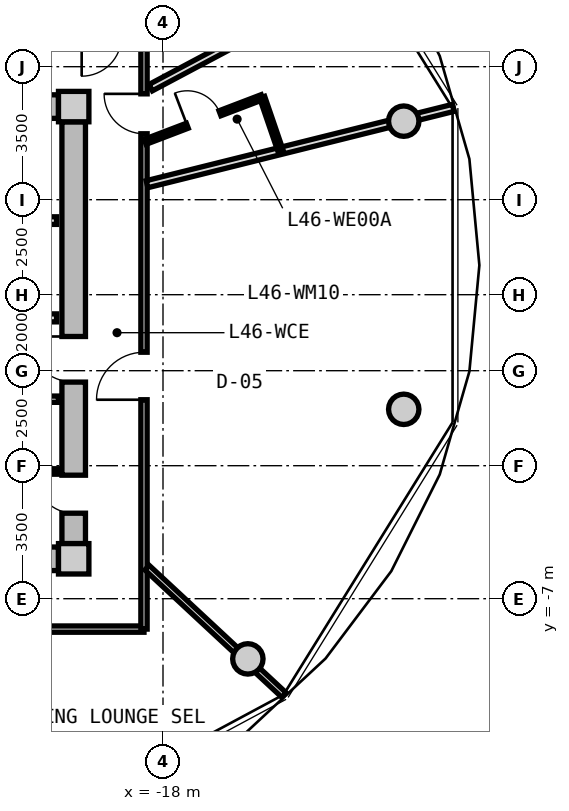
"""IFC4 building model, lengths in metres.
Left out: names, types, materials, properties, quantities, classifications, styles, units other than length and angle.
Written with IfcOpenShell. Run it as: python <this file> out.ifc"""

import sys

from ifc_helpers import new_model, si_unit, direction, frame, frame_2d, origin, origin_2d, place, context, subcontext, project, spatial, rectangle, circle, extrude, source, transform, mapped, element, fill, save


model = new_model("IFC4")
c1 = context("Model", 3, precision=1e-05, world=origin(), true_north=direction((0.0, 1.0)))
c2 = subcontext(c1, "Body", "Model", "MODEL_VIEW")
j1 = project(units=[si_unit("LENGTHUNIT", "METRE"), si_unit("PLANEANGLEUNIT", "RADIAN")], contexts=[c1])
p1 = place(None, origin())
s1 = spatial("IfcSite", under=j1, at=p1, CompositionType="ELEMENT")
p2 = place(p1, origin())
s2 = spatial("IfcBuilding", under=s1, at=p2, CompositionType="ELEMENT")
p3 = place(p2, frame((0.0, 0.0, 149.55)))
s3 = spatial("IfcBuildingStorey", under=s2, at=p3, CompositionType="ELEMENT", Elevation=149.55)
m1 = source(origin(), c2, "Body", "SweptSolid", [
    extrude(rectangle(XDim=0.8, YDim=0.8, at=origin_2d()), origin(), (0.0, 0.0, 1.0), 3.05),
])
for number, where, z_axis, x_axis in (
    (1, (-20.35, -5.95, 0.0), (0.0, 0.0, 1.0), (1.0, 0.0, 0.0)),
    (2, (-20.35, 5.95, 0.0), (0.0, 0.0, 1.0), (1.0, 0.0, 0.0)),
):
    element("IfcColumn", number, at=place(p3, frame(where, z_axis=z_axis, x_axis=x_axis)), inside=s3, PredefinedType="COLUMN", context=c2, shape_type="MappedRepresentation", body=[
        mapped(m1, transform((0.0, 0.0, 0.0), x_axis=(1.0, 0.0, 0.0), y_axis=(0.0, 1.0, 0.0), z_axis=(0.0, 0.0, 1.0), scale=1.0)),
    ])
m2 = source(origin(), c2, "Body", "SweptSolid", [
    extrude(rectangle(XDim=14.5, YDim=0.62, at=frame_2d((7.25, 0.0))), origin(), (0.0, 0.0, 1.0), 2.81),
])
for number, where, z_axis, x_axis in (
    (3, (-35.25, 5.95, 0.0), (0.0, 0.0, 1.0), (1.0, 0.0, 0.0)),
    (4, (-20.75, -5.95, 0.0), (0.0, 0.0, 1.0), (-1.0, 0.0, 0.0)),
):
    element("IfcWall", number, at=place(p3, frame(where, z_axis=z_axis, x_axis=x_axis)), inside=s3, PredefinedType="SHEAR", context=c2, shape_type="MappedRepresentation", body=[
        mapped(m2, transform((0.0, 0.0, 0.0), x_axis=(1.0, 0.0, 0.0), y_axis=(0.0, 1.0, 0.0), z_axis=(0.0, 0.0, 1.0), scale=1.0)),
    ])
m3 = source(origin(), c2, "Body", "SweptSolid", [
    extrude(rectangle(XDim=11.1, YDim=0.62, at=frame_2d((5.55, 0.0))), origin(), (0.0, 0.0, 1.0), 2.81),
])
p4 = place(p3, frame((-20.35, 5.55, 0.0), z_axis=(0.0, 0.0, 1.0), x_axis=(0.0, -1.0, 0.0)))
e5 = element("IfcWall", 5, at=p4, inside=s3, PredefinedType="SHEAR", context=c2, shape_type="MappedRepresentation", body=[
    mapped(m3, transform((0.0, 0.0, 0.0), x_axis=(1.0, 0.0, 0.0), y_axis=(0.0, 1.0, 0.0), z_axis=(0.0, 0.0, 1.0), scale=1.0)),
])
p5 = place(p4, frame((5.65, 0.0, 0.0)))
e6 = element("IfcOpeningElement", 6, at=p5, cuts=e5, PredefinedType="OPENING", context=c2, shape_type="SweptSolid", body=[
    extrude(rectangle(XDim=1.2, YDim=2.15, at=frame_2d((0.6, 1.075))), frame((0.0, 0.32, 0.0), z_axis=(0.0, -1.0, 0.0), x_axis=(1.0, 0.0, 0.0)), (0.0, 0.0, 1.0), 0.64),
])
p6 = place(p4, frame((9.3, 0.0, 0.0)))
e7 = element("IfcOpeningElement", 7, at=p6, cuts=e5, PredefinedType="OPENING", context=c2, shape_type="SweptSolid", body=[
    extrude(rectangle(XDim=1.0, YDim=2.1, at=frame_2d((0.5, 1.05))), frame((0.0, 0.32, 0.0), z_axis=(0.0, -1.0, 0.0), x_axis=(1.0, 0.0, 0.0)), (0.0, 0.0, 1.0), 0.64),
])
m4 = source(origin(), c2, "Body", "SweptSolid", [
    extrude(circle(Radius=0.4, at=origin_2d()), origin(), (0.0, 0.0, 1.0), 3.05),
])
for number, where, z_axis, x_axis in (
    (8, (-11.665, 5.567, 0.0), (0.0, 0.0, 1.0), (1.0, 0.0, 0.0)),
    (9, (-15.767, -8.584, 0.0), (0.0, 0.0, 1.0), (1.0, 0.0, 0.0)),
    (10, (-11.665, -2.016, 0.0), (0.0, 0.0, 1.0), (1.0, 0.0, 0.0)),
):
    element("IfcColumn", number, at=place(p3, frame(where, z_axis=z_axis, x_axis=x_axis)), inside=s3, PredefinedType="COLUMN", context=c2, shape_type="MappedRepresentation", body=[
        mapped(m4, transform((0.0, 0.0, 0.0), x_axis=(1.0, 0.0, 0.0), y_axis=(0.0, 1.0, 0.0), z_axis=(0.0, 0.0, 1.0), scale=1.0)),
    ])
m5 = source(origin(), c2, "Body", "SweptSolid", [
    extrude(rectangle(XDim=3.2, YDim=0.2, at=frame_2d((1.6, 0.0))), origin(), (0.0, 0.0, 1.0), 2.795),
])
p7 = place(p3, frame((-24.0, 2.95, 0.0), z_axis=(0.0, 0.0, 1.0), x_axis=(1.0, 0.0, 0.0)))
e11 = element("IfcWall", 11, at=p7, inside=s3, PredefinedType="PARTITIONING", context=c2, shape_type="MappedRepresentation", body=[
    mapped(m5, transform((0.0, 0.0, 0.0), x_axis=(1.0, 0.0, 0.0), y_axis=(0.0, 1.0, 0.0), z_axis=(0.0, 0.0, 1.0), scale=1.0)),
])
m6 = source(origin(), c2, "Body", "SweptSolid", [
    extrude(rectangle(XDim=6.66, YDim=0.21, at=frame_2d((3.33, 0.0))), origin(), (0.0, 0.0, 1.0), 2.795),
])
p8 = place(p3, frame((-27.46, 0.39, 0.0), z_axis=(0.0, 0.0, 1.0), x_axis=(1.0, 0.0, 0.0)))
e12 = element("IfcWall", 12, at=p8, inside=s3, PredefinedType="PARTITIONING", context=c2, shape_type="MappedRepresentation", body=[
    mapped(m6, transform((0.0, 0.0, 0.0), x_axis=(1.0, 0.0, 0.0), y_axis=(0.0, 1.0, 0.0), z_axis=(0.0, 0.0, 1.0), scale=1.0)),
])
p9 = place(p8, frame((1.0, 0.0, 0.0)))
e13 = element("IfcOpeningElement", 13, at=p9, cuts=e12, PredefinedType="OPENING", context=c2, shape_type="SweptSolid", body=[
    extrude(rectangle(XDim=1.2, YDim=2.15, at=frame_2d((0.6, 1.075))), frame((0.0, 0.115, 0.0), z_axis=(0.0, -1.0, 0.0), x_axis=(1.0, 0.0, 0.0)), (0.0, 0.0, 1.0), 0.23),
])
m7 = source(origin(), c2, "Body", "SweptSolid", [
    extrude(rectangle(XDim=2.7, YDim=0.165, at=frame_2d((1.35, 0.0))), origin(), (0.0, 0.0, 1.0), 2.795),
])
p10 = place(p3, frame((-23.45, -1.75, 0.0), z_axis=(0.0, 0.0, 1.0), x_axis=(1.0, 0.0, 0.0)))
e14 = element("IfcWall", 14, at=p10, inside=s3, PredefinedType="PARTITIONING", context=c2, shape_type="MappedRepresentation", body=[
    mapped(m7, transform((0.0, 0.0, 0.0), x_axis=(1.0, 0.0, 0.0), y_axis=(0.0, 1.0, 0.0), z_axis=(0.0, 0.0, 1.0), scale=1.0)),
])
p11 = place(p10, frame((0.85, 0.0, 0.0)))
e15 = element("IfcOpeningElement", 15, at=p11, cuts=e14, PredefinedType="OPENING", context=c2, shape_type="SweptSolid", body=[
    extrude(rectangle(XDim=0.925, YDim=2.1, at=frame_2d((0.462, 1.05))), frame((0.0, 0.093, 0.0), z_axis=(0.0, -1.0, 0.0), x_axis=(1.0, 0.0, 0.0)), (0.0, 0.0, 1.0), 0.185),
])
m8 = source(origin(), c2, "Body", "SweptSolid", [
    extrude(rectangle(XDim=2.7, YDim=0.14, at=frame_2d((1.35, 0.0))), origin(), (0.0, 0.0, 1.0), 2.795),
])
p12 = place(p3, frame((-23.45, -3.65, 0.0), z_axis=(0.0, 0.0, 1.0), x_axis=(1.0, 0.0, 0.0)))
e16 = element("IfcWall", 16, at=p12, inside=s3, PredefinedType="PARTITIONING", context=c2, shape_type="MappedRepresentation", body=[
    mapped(m8, transform((0.0, 0.0, 0.0), x_axis=(1.0, 0.0, 0.0), y_axis=(0.0, 1.0, 0.0), z_axis=(0.0, 0.0, 1.0), scale=1.0)),
])
m9 = source(origin(), c2, "Body", "SweptSolid", [
    extrude(rectangle(XDim=8.6, YDim=0.165, at=frame_2d((4.3, 0.0))), origin(), (0.0, 0.0, 1.0), 2.795),
])
p13 = place(p3, frame((-18.5, -7.8, 0.0), z_axis=(0.0, 0.0, 1.0), x_axis=(-1.0, 0.0, 0.0)))
e17 = element("IfcWall", 17, at=p13, inside=s3, PredefinedType="PARTITIONING", context=c2, shape_type="MappedRepresentation", body=[
    mapped(m9, transform((0.0, 0.0, 0.0), x_axis=(1.0, 0.0, 0.0), y_axis=(0.0, 1.0, 0.0), z_axis=(0.0, 0.0, 1.0), scale=1.0)),
])
p14 = place(p13, frame((3.775, 0.0, 0.0)))
e18 = element("IfcOpeningElement", 18, at=p14, cuts=e17, PredefinedType="OPENING", context=c2, shape_type="SweptSolid", body=[
    extrude(rectangle(XDim=1.05, YDim=2.15, at=frame_2d((0.525, 1.075))), frame((0.0, 0.093, 0.0), z_axis=(0.0, -1.0, 0.0), x_axis=(1.0, 0.0, 0.0)), (0.0, 0.0, 1.0), 0.185),
])
m10 = source(origin(), c2, "Body", "SweptSolid", [
    extrude(rectangle(XDim=15.6, YDim=0.165, at=frame_2d((7.8, 0.0))), origin(), (0.0, 0.0, 1.0), 2.795),
])
p15 = place(p3, frame((-18.5, 7.8, 0.0), z_axis=(0.0, 0.0, 1.0), x_axis=(0.0, -1.0, 0.0)))
e19 = element("IfcWall", 19, at=p15, inside=s3, PredefinedType="PARTITIONING", context=c2, shape_type="MappedRepresentation", body=[
    mapped(m10, transform((0.0, 0.0, 0.0), x_axis=(1.0, 0.0, 0.0), y_axis=(0.0, 1.0, 0.0), z_axis=(0.0, 0.0, 1.0), scale=1.0)),
])
p16 = place(p15, frame((8.314, 0.0, 0.0)))
e20 = element("IfcOpeningElement", 20, at=p16, cuts=e19, PredefinedType="OPENING", context=c2, shape_type="SweptSolid", body=[
    extrude(rectangle(XDim=1.25, YDim=2.2, at=frame_2d((0.625, 1.1))), frame((0.0, 0.093, 0.0), z_axis=(0.0, -1.0, 0.0), x_axis=(1.0, 0.0, 0.0)), (0.0, 0.0, 1.0), 0.185),
])
p17 = place(p15, frame((1.515, 0.0, 0.0)))
e21 = element("IfcOpeningElement", 21, at=p17, cuts=e19, PredefinedType="OPENING", context=c2, shape_type="SweptSolid", body=[
    extrude(rectangle(XDim=1.05, YDim=2.15, at=frame_2d((0.525, 1.075))), frame((0.0, 0.093, 0.0), z_axis=(0.0, -1.0, 0.0), x_axis=(1.0, 0.0, 0.0)), (0.0, 0.0, 1.0), 0.185),
])
m11 = source(origin(), c2, "Body", "SweptSolid", [
    extrude(rectangle(XDim=4.927, YDim=0.165, at=frame_2d((2.463, 0.0))), origin(), (0.0, 0.0, 1.0), 2.345),
])
p18 = place(p3, frame((-18.42, -6.183, 0.0), z_axis=(0.0, 0.0, 1.0), x_axis=(0.732191335987, -0.681098999783, 0.0)))
e22 = element("IfcWall", 22, at=p18, inside=s3, PredefinedType="PARTITIONING", context=c2, shape_type="MappedRepresentation", body=[
    mapped(m11, transform((0.0, 0.0, 0.0), x_axis=(1.0, 0.0, 0.0), y_axis=(0.0, 1.0, 0.0), z_axis=(0.0, 0.0, 1.0), scale=1.0)),
])
m12 = source(origin(), c2, "Body", "SweptSolid", [
    extrude(rectangle(XDim=8.305, YDim=0.19, at=frame_2d((4.153, 0.0))), origin(), (0.0, 0.0, 1.0), 2.345),
])
p19 = place(p3, frame((-18.42, 3.908, 0.0), z_axis=(0.0, 0.0, 1.0), x_axis=(0.970309994378, 0.241864662175, 0.0)))
e23 = element("IfcWall", 23, at=p19, inside=s3, PredefinedType="PARTITIONING", context=c2, shape_type="MappedRepresentation", body=[
    mapped(m12, transform((0.0, 0.0, 0.0), x_axis=(1.0, 0.0, 0.0), y_axis=(0.0, 1.0, 0.0), z_axis=(0.0, 0.0, 1.0), scale=1.0)),
])
m13 = source(origin(), c2, "Body", "SweptSolid", [
    extrude(rectangle(XDim=6.499, YDim=0.19, at=frame_2d((3.25, 0.0))), origin(), (0.0, 0.0, 1.0), 2.795),
])
p20 = place(p3, frame((-18.324, 6.449, 0.0), z_axis=(0.0, 0.0, 1.0), x_axis=(0.882715595921, 0.469907625729, 0.0)))
e24 = element("IfcWall", 24, at=p20, inside=s3, PredefinedType="PARTITIONING", context=c2, shape_type="MappedRepresentation", body=[
    mapped(m13, transform((0.0, 0.0, 0.0), x_axis=(1.0, 0.0, 0.0), y_axis=(0.0, 1.0, 0.0), z_axis=(0.0, 0.0, 1.0), scale=1.0)),
])
m14 = source(origin(), c2, "Body", "SweptSolid", [
    extrude(rectangle(XDim=3.295, YDim=0.14, at=frame_2d((1.647, 0.0))), origin(), (0.0, 0.0, 1.0), 2.795),
])
p21 = place(p3, frame((-18.47, 5.023, 0.0), z_axis=(0.0, 0.0, 1.0), x_axis=(0.934202224769, 0.356743890258, 0.0)))
e25 = element("IfcWall", 25, at=p21, inside=s3, PredefinedType="PARTITIONING", context=c2, shape_type="MappedRepresentation", body=[
    mapped(m14, transform((0.0, 0.0, 0.0), x_axis=(1.0, 0.0, 0.0), y_axis=(0.0, 1.0, 0.0), z_axis=(0.0, 0.0, 1.0), scale=1.0)),
])
p22 = place(p21, frame((1.188, 0.0, 0.0)))
e26 = element("IfcOpeningElement", 26, at=p22, cuts=e25, PredefinedType="OPENING", context=c2, shape_type="SweptSolid", body=[
    extrude(rectangle(XDim=0.92, YDim=2.1, at=frame_2d((0.46, 1.05))), frame((0.0, 0.08, 0.0), z_axis=(0.0, -1.0, 0.0), x_axis=(1.0, 0.0, 0.0)), (0.0, 0.0, 1.0), 0.16),
])
m15 = source(origin(), c2, "Body", "SweptSolid", [
    extrude(rectangle(XDim=1.479, YDim=0.14, at=frame_2d((0.739, 0.0))), origin(), (0.0, 0.0, 1.0), 2.795),
])
p23 = place(p3, frame((-15.392, 6.198, 0.0), z_axis=(0.0, 0.0, 1.0), x_axis=(0.324438293903, -0.945906862989, 0.0)))
e27 = element("IfcWall", 27, at=p23, inside=s3, PredefinedType="PARTITIONING", context=c2, shape_type="MappedRepresentation", body=[
    mapped(m15, transform((0.0, 0.0, 0.0), x_axis=(1.0, 0.0, 0.0), y_axis=(0.0, 1.0, 0.0), z_axis=(0.0, 0.0, 1.0), scale=1.0)),
])
m16 = source(origin(), c2, "Body", "SweptSolid", [
    extrude(rectangle(XDim=1.2, YDim=2.15, at=frame_2d((0.6, 1.075))), frame((0.0, 0.025, 0.0), z_axis=(0.0, -1.0, 0.0), x_axis=(1.0, 0.0, 0.0)), (0.0, 0.0, 1.0), 0.05),
])
p24 = place(p5, frame((1.2, 0.0, 0.0), z_axis=(0.0, 0.0, 1.0), x_axis=(-1.0, 0.0, 0.0)))
e28 = element("IfcDoor", 28, at=p24, inside=s3, OperationType="SINGLE_SWING_RIGHT", PredefinedType="DOOR", context=c2, shape_type="MappedRepresentation", body=[
    mapped(m16, transform((0.0, 0.0, 0.0), x_axis=(1.0, 0.0, 0.0), y_axis=(0.0, 1.0, 0.0), z_axis=(0.0, 0.0, 1.0), scale=1.0)),
])
fill(e6, e28)
m17 = source(origin(), c2, "Body", "SweptSolid", [
    extrude(rectangle(XDim=1.0, YDim=2.1, at=frame_2d((0.5, 1.05))), frame((0.0, 0.025, 0.0), z_axis=(0.0, -1.0, 0.0), x_axis=(1.0, 0.0, 0.0)), (0.0, 0.0, 1.0), 0.05),
])
p25 = place(p6, frame((1.0, 0.0, 0.0), z_axis=(0.0, 0.0, 1.0), x_axis=(-1.0, 0.0, 0.0)))
e29 = element("IfcDoor", 29, at=p25, inside=s3, OperationType="SINGLE_SWING_RIGHT", PredefinedType="DOOR", context=c2, shape_type="MappedRepresentation", body=[
    mapped(m17, transform((0.0, 0.0, 0.0), x_axis=(1.0, 0.0, 0.0), y_axis=(0.0, 1.0, 0.0), z_axis=(0.0, 0.0, 1.0), scale=1.0)),
])
fill(e7, e29)
m18 = source(origin(), c2, "Body", "SweptSolid", [
    extrude(rectangle(XDim=1.25, YDim=2.2, at=frame_2d((0.625, 1.1))), frame((0.0, 0.025, 0.0), z_axis=(0.0, -1.0, 0.0), x_axis=(1.0, 0.0, 0.0)), (0.0, 0.0, 1.0), 0.05),
])
p26 = place(p16, frame((1.25, 0.0, 0.0), z_axis=(0.0, 0.0, 1.0), x_axis=(-1.0, 0.0, 0.0)))
e30 = element("IfcDoor", 30, at=p26, inside=s3, OperationType="SINGLE_SWING_LEFT", PredefinedType="DOOR", context=c2, shape_type="MappedRepresentation", body=[
    mapped(m18, transform((0.0, 0.0, 0.0), x_axis=(1.0, 0.0, 0.0), y_axis=(0.0, 1.0, 0.0), z_axis=(0.0, 0.0, 1.0), scale=1.0)),
])
fill(e20, e30)
m19 = source(origin(), c2, "Body", "SweptSolid", [
    extrude(rectangle(XDim=1.05, YDim=2.15, at=frame_2d((0.525, 1.075))), frame((0.0, 0.025, 0.0), z_axis=(0.0, -1.0, 0.0), x_axis=(1.0, 0.0, 0.0)), (0.0, 0.0, 1.0), 0.05),
])
p27 = place(p17, frame((1.05, 0.0, 0.0), z_axis=(0.0, 0.0, 1.0), x_axis=(-1.0, 0.0, 0.0)))
e31 = element("IfcDoor", 31, at=p27, inside=s3, OperationType="SINGLE_SWING_RIGHT", PredefinedType="DOOR", context=c2, shape_type="MappedRepresentation", body=[
    mapped(m19, transform((0.0, 0.0, 0.0), x_axis=(1.0, 0.0, 0.0), y_axis=(0.0, 1.0, 0.0), z_axis=(0.0, 0.0, 1.0), scale=1.0)),
])
fill(e21, e31)
m20 = source(origin(), c2, "Body", "SweptSolid", [
    extrude(rectangle(XDim=0.92, YDim=2.1, at=frame_2d((0.46, 1.05))), frame((0.0, 0.025, 0.0), z_axis=(0.0, -1.0, 0.0), x_axis=(1.0, 0.0, 0.0)), (0.0, 0.0, 1.0), 0.05),
])
p28 = place(p22, origin())
e32 = element("IfcDoor", 32, at=p28, inside=s3, OperationType="SINGLE_SWING_LEFT", PredefinedType="DOOR", context=c2, shape_type="MappedRepresentation", body=[
    mapped(m20, transform((0.0, 0.0, 0.0), x_axis=(1.0, 0.0, 0.0), y_axis=(0.0, 1.0, 0.0), z_axis=(0.0, 0.0, 1.0), scale=1.0)),
])
fill(e26, e32)
save(model, sys.argv[1])
